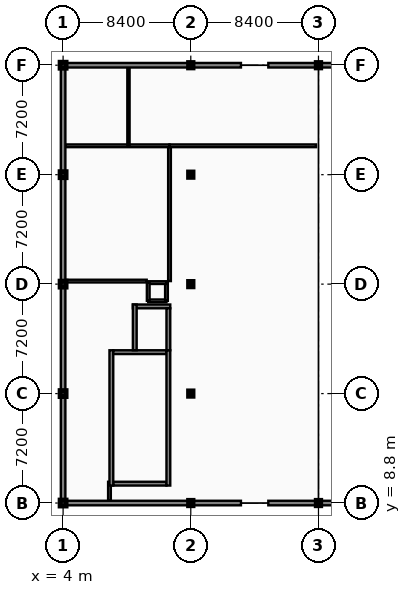
"""IFC4 building model, lengths in metres.
Left out: names, types, materials, properties, quantities, classifications, styles, units other than length and angle.
Written with IfcOpenShell. Run it as: python <this file> out.ifc"""

import sys

from ifc_helpers import new_model, si_unit, direction, frame, frame_2d, origin, origin_2d, place, context, subcontext, project, spatial, rectangle, i_section, extrude, element, fill, save


model = new_model("IFC4")
c1 = context("Model", 3, precision=1e-05, world=origin(), true_north=direction((0.0, 1.0)))
c2 = subcontext(c1, "Body", "Model", "MODEL_VIEW")
j1 = project(units=[si_unit("LENGTHUNIT", "METRE"), si_unit("PLANEANGLEUNIT", "RADIAN")], contexts=[c1])
p1 = place(None, origin())
s1 = spatial("IfcSite", under=j1, at=p1, CompositionType="ELEMENT")
p2 = place(p1, origin())
s2 = spatial("IfcBuilding", under=s1, at=p2, CompositionType="ELEMENT")
p3 = place(p2, frame((0.0, 0.0, 9.6)))
s3 = spatial("IfcBuildingStorey", under=s2, at=p3, CompositionType="ELEMENT", Elevation=9.6)
for number, where, z_axis, x_axis in (
    (1, (4.0, 8.8, 0.0), (0.0, 0.0, 1.0), (1.0, 0.0, 0.0)),
    (2, (4.0, 16.0, 0.0), (0.0, 0.0, 1.0), (1.0, 0.0, 0.0)),
    (3, (4.0, 23.2, 0.0), (0.0, 0.0, 1.0), (1.0, 0.0, 0.0)),
    (4, (4.0, 30.4, 0.0), (0.0, 0.0, 1.0), (1.0, 0.0, 0.0)),
    (5, (4.0, 37.6, 0.0), (0.0, 0.0, 1.0), (1.0, 0.0, 0.0)),
):
    element("IfcColumn", number, at=place(p3, frame(where, z_axis=z_axis, x_axis=x_axis)), inside=s3, PredefinedType="COLUMN", context=c2, shape_type="SweptSolid", body=[
        extrude(rectangle(XDim=0.4, YDim=0.4, at=origin_2d()), origin(), (0.0, 0.0, 1.0), 4.2),
    ])
for number, where, z_axis, x_axis in (
    (6, (12.4, 8.8, 0.0), (0.0, 0.0, 1.0), (1.0, 0.0, 0.0)),
    (7, (12.4, 16.0, 0.0), (0.0, 0.0, 1.0), (1.0, 0.0, 0.0)),
    (8, (12.4, 23.2, 0.0), (0.0, 0.0, 1.0), (1.0, 0.0, 0.0)),
    (9, (12.4, 30.4, 0.0), (0.0, 0.0, 1.0), (1.0, 0.0, 0.0)),
    (10, (12.4, 37.6, 0.0), (0.0, 0.0, 1.0), (1.0, 0.0, 0.0)),
    (11, (20.8, 8.8, 0.0), (0.0, 0.0, 1.0), (1.0, 0.0, 0.0)),
    (12, (20.8, 37.6, 0.0), (0.0, 0.0, 1.0), (1.0, 0.0, 0.0)),
):
    element("IfcColumn", number, at=place(p3, frame(where, z_axis=z_axis, x_axis=x_axis)), inside=s3, PredefinedType="COLUMN", context=c2, shape_type="SweptSolid", body=[
        extrude(i_section(OverallWidth=0.3, OverallDepth=0.36, WebThickness=0.012, FlangeThickness=0.022, at=origin_2d()), origin(), (0.0, 0.0, 1.0), 4.2),
    ])
p4 = place(p3, frame((7.05, 8.96, 0.0), z_axis=(0.0, 0.0, 1.0), x_axis=(0.0, 1.0, 0.0)))
e13 = element("IfcWall", 13, at=p4, inside=s3, PredefinedType="PARTITIONING", context=c2, shape_type="SweptSolid", body=[
    extrude(rectangle(XDim=1.24, YDim=0.18, at=frame_2d((0.62, 0.0))), origin(), (0.0, 0.0, 1.0), 3.63),
])
p5 = place(p3, frame((4.16, 23.4, 0.0), z_axis=(0.0, 0.0, 1.0), x_axis=(1.0, 0.0, 0.0)))
e14 = element("IfcWall", 14, at=p5, inside=s3, PredefinedType="PARTITIONING", context=c2, shape_type="SweptSolid", body=[
    extrude(rectangle(XDim=5.34, YDim=0.18, at=frame_2d((2.67, 0.0))), origin(), (0.0, 0.0, 1.0), 3.63),
])
p6 = place(p3, frame((11.0, 23.4, 0.0), z_axis=(0.0, 0.0, 1.0), x_axis=(0.0, 1.0, 0.0)))
e15 = element("IfcWall", 15, at=p6, inside=s3, PredefinedType="PARTITIONING", context=c2, shape_type="SweptSolid", body=[
    extrude(rectangle(XDim=8.9, YDim=0.18, at=frame_2d((4.45, 0.0))), origin(), (0.0, 0.0, 1.0), 3.27),
])
p7 = place(p6, frame((3.95, 0.0, -0.01)))
e16 = element("IfcOpeningElement", 16, at=p7, cuts=e15, PredefinedType="OPENING", context=c2, shape_type="SweptSolid", body=[
    extrude(rectangle(XDim=1.0, YDim=2.16, at=frame_2d((0.5, 1.08))), frame((0.0, 0.1, 0.0), z_axis=(0.0, -1.0, 0.0), x_axis=(1.0, 0.0, 0.0)), (0.0, 0.0, 1.0), 0.2),
])
p8 = place(p3, frame((4.16, 32.3, 0.0), z_axis=(0.0, 0.0, 1.0), x_axis=(1.0, 0.0, 0.0)))
e17 = element("IfcWall", 17, at=p8, inside=s3, PredefinedType="PARTITIONING", context=c2, shape_type="SweptSolid", body=[
    extrude(rectangle(XDim=6.84, YDim=0.18, at=frame_2d((3.42, 0.0))), origin(), (0.0, 0.0, 1.0), 3.59),
])
p9 = place(p3, frame((8.3, 32.3, 0.0), z_axis=(0.0, 0.0, 1.0), x_axis=(0.0, 1.0, 0.0)))
e18 = element("IfcWall", 18, at=p9, inside=s3, PredefinedType="PARTITIONING", context=c2, shape_type="SweptSolid", body=[
    extrude(rectangle(XDim=5.16, YDim=0.15, at=frame_2d((2.58, 0.0))), origin(), (0.0, 0.0, 1.0), 3.63),
])
p10 = place(p9, frame((2.105, 0.0, -0.01)))
e19 = element("IfcOpeningElement", 19, at=p10, cuts=e18, PredefinedType="OPENING", context=c2, shape_type="SweptSolid", body=[
    extrude(rectangle(XDim=0.95, YDim=2.16, at=frame_2d((0.475, 1.08))), frame((0.0, 0.085, 0.0), z_axis=(0.0, -1.0, 0.0), x_axis=(1.0, 0.0, 0.0)), (0.0, 0.0, 1.0), 0.17),
])
p11 = place(p3, frame((11.0, 32.3, 0.0), z_axis=(0.0, 0.0, 1.0), x_axis=(1.0, 0.0, 0.0)))
e20 = element("IfcWall", 20, at=p11, inside=s3, PredefinedType="PARTITIONING", context=c2, shape_type="SweptSolid", body=[
    extrude(rectangle(XDim=9.64, YDim=0.18, at=frame_2d((4.82, 0.0))), origin(), (0.0, 0.0, 1.0), 3.63),
])
p12 = place(p11, frame((3.888, 0.0, -0.01)))
e21 = element("IfcOpeningElement", 21, at=p12, cuts=e20, PredefinedType="OPENING", context=c2, shape_type="SweptSolid", body=[
    extrude(rectangle(XDim=1.0, YDim=2.16, at=frame_2d((0.5, 1.08))), frame((0.0, 0.1, 0.0), z_axis=(0.0, -1.0, 0.0), x_axis=(1.0, 0.0, 0.0)), (0.0, 0.0, 1.0), 0.2),
])
p13 = place(p3, frame((4.0, 8.8, 0.0), z_axis=(0.0, 0.0, 1.0), x_axis=(1.0, 0.0, 0.0)))
e22 = element("IfcWall", 22, at=p13, inside=s3, PredefinedType="SOLIDWALL", context=c2, shape_type="SweptSolid", body=[
    extrude(rectangle(XDim=8.4, YDim=0.3, at=frame_2d((4.2, 0.0))), origin(), (0.0, 0.0, 1.0), 3.63),
])
p14 = place(p13, frame((0.46, 0.0, 0.85)))
e23 = element("IfcOpeningElement", 23, at=p14, cuts=e22, PredefinedType="OPENING", context=c2, shape_type="SweptSolid", body=[
    extrude(rectangle(XDim=0.9, YDim=2.1, at=frame_2d((0.45, 1.05))), frame((0.0, 0.16, 0.0), z_axis=(0.0, -1.0, 0.0), x_axis=(1.0, 0.0, 0.0)), (0.0, 0.0, 1.0), 0.32),
])
p15 = place(p13, frame((6.86, 0.0, 0.85)))
e24 = element("IfcOpeningElement", 24, at=p15, cuts=e22, PredefinedType="OPENING", context=c2, shape_type="SweptSolid", body=[
    extrude(rectangle(XDim=0.9, YDim=2.1, at=frame_2d((0.45, 1.05))), frame((0.0, 0.16, 0.0), z_axis=(0.0, -1.0, 0.0), x_axis=(1.0, 0.0, 0.0)), (0.0, 0.0, 1.0), 0.32),
])
for number, where, z_axis, x_axis in (
    (25, (12.4, 8.8, 0.0), (0.0, 0.0, 1.0), (1.0, 0.0, 0.0)),
    (26, (17.5, 8.8, 0.0), (0.0, 0.0, 1.0), (1.0, 0.0, 0.0)),
    (27, (20.8, 8.8, 0.0), (0.0, 0.0, 1.0), (1.0, 0.0, 0.0)),
):
    element("IfcWall", number, at=place(p3, frame(where, z_axis=z_axis, x_axis=x_axis)), inside=s3, PredefinedType="SOLIDWALL", context=c2, shape_type="SweptSolid", body=[
        extrude(rectangle(XDim=3.3, YDim=0.3, at=frame_2d((1.65, 0.0))), origin(), (0.0, 0.0, 1.0), 4.2),
    ])
p16 = place(p3, frame((12.4, 37.6, 0.0), z_axis=(0.0, 0.0, 1.0), x_axis=(-1.0, 0.0, 0.0)))
e28 = element("IfcWall", 28, at=p16, inside=s3, PredefinedType="SOLIDWALL", context=c2, shape_type="SweptSolid", body=[
    extrude(rectangle(XDim=8.4, YDim=0.3, at=frame_2d((4.2, 0.0))), origin(), (0.0, 0.0, 1.0), 3.59),
])
p17 = place(p16, frame((0.46, 0.0, 0.85)))
e29 = element("IfcOpeningElement", 29, at=p17, cuts=e28, PredefinedType="OPENING", context=c2, shape_type="SweptSolid", body=[
    extrude(rectangle(XDim=0.9, YDim=2.1, at=frame_2d((0.45, 1.05))), frame((0.0, 0.16, 0.0), z_axis=(0.0, -1.0, 0.0), x_axis=(1.0, 0.0, 0.0)), (0.0, 0.0, 1.0), 0.32),
])
p18 = place(p16, frame((6.86, 0.0, 0.85)))
e30 = element("IfcOpeningElement", 30, at=p18, cuts=e28, PredefinedType="OPENING", context=c2, shape_type="SweptSolid", body=[
    extrude(rectangle(XDim=0.9, YDim=2.1, at=frame_2d((0.45, 1.05))), frame((0.0, 0.16, 0.0), z_axis=(0.0, -1.0, 0.0), x_axis=(1.0, 0.0, 0.0)), (0.0, 0.0, 1.0), 0.32),
])
for number, where, z_axis, x_axis in (
    (31, (20.8, 37.6, 0.0), (0.0, 0.0, 1.0), (-1.0, 0.0, 0.0)),
    (32, (15.7, 37.6, 0.0), (0.0, 0.0, 1.0), (-1.0, 0.0, 0.0)),
    (33, (24.1, 37.6, 0.0), (0.0, 0.0, 1.0), (-1.0, 0.0, 0.0)),
):
    element("IfcWall", number, at=place(p3, frame(where, z_axis=z_axis, x_axis=x_axis)), inside=s3, PredefinedType="SOLIDWALL", context=c2, shape_type="SweptSolid", body=[
        extrude(rectangle(XDim=3.3, YDim=0.3, at=frame_2d((1.65, 0.0))), origin(), (0.0, 0.0, 1.0), 4.2),
    ])
for number, where, z_axis, x_axis in (
    (34, (4.0, 16.0, 0.0), (0.0, 0.0, 1.0), (0.0, -1.0, 0.0)),
    (35, (4.0, 23.2, 0.0), (0.0, 0.0, 1.0), (0.0, -1.0, 0.0)),
):
    element("IfcWall", number, at=place(p3, frame(where, z_axis=z_axis, x_axis=x_axis)), inside=s3, PredefinedType="SOLIDWALL", context=c2, shape_type="SweptSolid", body=[
        extrude(rectangle(XDim=7.2, YDim=0.3, at=frame_2d((3.6, 0.0))), origin(), (0.0, 0.0, 1.0), 3.63),
    ])
p19 = place(p3, frame((4.0, 30.4, 0.0), z_axis=(0.0, 0.0, 1.0), x_axis=(0.0, -1.0, 0.0)))
e36 = element("IfcWall", 36, at=p19, inside=s3, PredefinedType="SOLIDWALL", context=c2, shape_type="SweptSolid", body=[
    extrude(rectangle(XDim=7.2, YDim=0.3, at=frame_2d((3.6, 0.0))), origin(), (0.0, 0.0, 1.0), 3.27),
])
p20 = place(p19, frame((0.46, 0.0, 0.85)))
e37 = element("IfcOpeningElement", 37, at=p20, cuts=e36, PredefinedType="OPENING", context=c2, shape_type="SweptSolid", body=[
    extrude(rectangle(XDim=0.9, YDim=2.1, at=frame_2d((0.45, 1.05))), frame((0.0, 0.16, 0.0), z_axis=(0.0, -1.0, 0.0), x_axis=(1.0, 0.0, 0.0)), (0.0, 0.0, 1.0), 0.32),
])
p21 = place(p19, frame((5.66, 0.0, 0.85)))
e38 = element("IfcOpeningElement", 38, at=p21, cuts=e36, PredefinedType="OPENING", context=c2, shape_type="SweptSolid", body=[
    extrude(rectangle(XDim=0.9, YDim=2.1, at=frame_2d((0.45, 1.05))), frame((0.0, 0.16, 0.0), z_axis=(0.0, -1.0, 0.0), x_axis=(1.0, 0.0, 0.0)), (0.0, 0.0, 1.0), 0.32),
])
p22 = place(p3, frame((4.0, 37.6, 0.0), z_axis=(0.0, 0.0, 1.0), x_axis=(0.0, -1.0, 0.0)))
e39 = element("IfcWall", 39, at=p22, inside=s3, PredefinedType="SOLIDWALL", context=c2, shape_type="SweptSolid", body=[
    extrude(rectangle(XDim=7.2, YDim=0.3, at=frame_2d((3.6, 0.0))), origin(), (0.0, 0.0, 1.0), 3.27),
])
p23 = place(p22, frame((0.46, 0.0, 0.85)))
e40 = element("IfcOpeningElement", 40, at=p23, cuts=e39, PredefinedType="OPENING", context=c2, shape_type="SweptSolid", body=[
    extrude(rectangle(XDim=0.9, YDim=2.1, at=frame_2d((0.45, 1.05))), frame((0.0, 0.16, 0.0), z_axis=(0.0, -1.0, 0.0), x_axis=(1.0, 0.0, 0.0)), (0.0, 0.0, 1.0), 0.32),
])
p24 = place(p22, frame((5.66, 0.0, 0.85)))
e41 = element("IfcOpeningElement", 41, at=p24, cuts=e39, PredefinedType="OPENING", context=c2, shape_type="SweptSolid", body=[
    extrude(rectangle(XDim=0.9, YDim=2.1, at=frame_2d((0.45, 1.05))), frame((0.0, 0.16, 0.0), z_axis=(0.0, -1.0, 0.0), x_axis=(1.0, 0.0, 0.0)), (0.0, 0.0, 1.0), 0.32),
])
p25 = place(p3, frame((7.3, 10.075, 0.0), z_axis=(0.0, 0.0, 1.0), x_axis=(1.0, 0.0, 0.0)))
e42 = element("IfcWall", 42, at=p25, inside=s3, PredefinedType="SHEAR", context=c2, shape_type="SweptSolid", body=[
    extrude(rectangle(XDim=3.5, YDim=0.25, at=frame_2d((1.75, 0.0))), origin(), (0.0, 0.0, 1.0), 4.2),
])
p26 = place(p25, frame((1.1, 0.0, -0.01)))
e43 = element("IfcOpeningElement", 43, at=p26, cuts=e42, PredefinedType="OPENING", context=c2, shape_type="SweptSolid", body=[
    extrude(rectangle(XDim=1.3, YDim=2.16, at=frame_2d((0.65, 1.08))), frame((0.0, 0.135, 0.0), z_axis=(0.0, -1.0, 0.0), x_axis=(1.0, 0.0, 0.0)), (0.0, 0.0, 1.0), 0.27),
])
p27 = place(p3, frame((7.175, 9.95, 0.0), z_axis=(0.0, 0.0, 1.0), x_axis=(0.0, 1.0, 0.0)))
e44 = element("IfcWall", 44, at=p27, inside=s3, PredefinedType="SHEAR", context=c2, shape_type="SweptSolid", body=[
    extrude(rectangle(XDim=8.9, YDim=0.25, at=frame_2d((4.45, 0.0))), origin(), (0.0, 0.0, 1.0), 4.2),
])
p28 = place(p3, frame((10.8, 18.725, 0.0), z_axis=(0.0, 0.0, 1.0), x_axis=(-1.0, 0.0, 0.0)))
e45 = element("IfcWall", 45, at=p28, inside=s3, PredefinedType="SHEAR", context=c2, shape_type="SweptSolid", body=[
    extrude(rectangle(XDim=3.5, YDim=0.25, at=frame_2d((1.75, 0.0))), origin(), (0.0, 0.0, 1.0), 4.2),
])
p29 = place(p3, frame((10.925, 9.95, 0.0), z_axis=(0.0, 0.0, 1.0), x_axis=(0.0, 1.0, 0.0)))
e46 = element("IfcWall", 46, at=p29, inside=s3, PredefinedType="SHEAR", context=c2, shape_type="SweptSolid", body=[
    extrude(rectangle(XDim=8.9, YDim=0.25, at=frame_2d((4.45, 0.0))), origin(), (0.0, 0.0, 1.0), 4.2),
])
p30 = place(p3, frame((8.59, 21.735, 0.0), z_axis=(0.0, 0.0, 1.0), x_axis=(1.0, 0.0, 0.0)))
e47 = element("IfcWall", 47, at=p30, inside=s3, PredefinedType="SHEAR", context=c2, shape_type="SweptSolid", body=[
    extrude(rectangle(XDim=2.46, YDim=0.25, at=frame_2d((1.23, 0.0))), origin(), (0.0, 0.0, 1.0), 4.2),
])
p31 = place(p3, frame((10.925, 18.85, 0.0), z_axis=(0.0, 0.0, 1.0), x_axis=(0.0, 1.0, 0.0)))
e48 = element("IfcWall", 48, at=p31, inside=s3, PredefinedType="SHEAR", context=c2, shape_type="SweptSolid", body=[
    extrude(rectangle(XDim=2.76, YDim=0.25, at=frame_2d((1.38, 0.0))), origin(), (0.0, 0.0, 1.0), 4.2),
])
p32 = place(p31, frame((0.83, 0.0, -0.01)))
e49 = element("IfcOpeningElement", 49, at=p32, cuts=e48, PredefinedType="OPENING", context=c2, shape_type="SweptSolid", body=[
    extrude(rectangle(XDim=1.1, YDim=2.16, at=frame_2d((0.55, 1.08))), frame((0.0, 0.135, 0.0), z_axis=(0.0, -1.0, 0.0), x_axis=(1.0, 0.0, 0.0)), (0.0, 0.0, 1.0), 0.27),
])
p33 = place(p3, frame((8.715, 18.85, 0.0), z_axis=(0.0, 0.0, 1.0), x_axis=(0.0, 1.0, 0.0)))
e50 = element("IfcWall", 50, at=p33, inside=s3, PredefinedType="SHEAR", context=c2, shape_type="SweptSolid", body=[
    extrude(rectangle(XDim=3.01, YDim=0.25, at=frame_2d((1.505, 0.0))), origin(), (0.0, 0.0, 1.0), 4.2),
])
p34 = place(p3, frame((9.6, 22.1, 0.0), z_axis=(0.0, 0.0, 1.0), x_axis=(1.0, 0.0, 0.0)))
e51 = element("IfcWall", 51, at=p34, inside=s3, PredefinedType="SOLIDWALL", context=c2, shape_type="SweptSolid", body=[
    extrude(rectangle(XDim=1.2, YDim=0.18, at=frame_2d((0.6, 0.0))), origin(), (0.0, 0.0, 1.0), 3.97),
])
p35 = place(p3, frame((10.8, 22.1, 0.0), z_axis=(0.0, 0.0, 1.0), x_axis=(0.0, 1.0, 0.0)))
e52 = element("IfcWall", 52, at=p35, inside=s3, PredefinedType="SOLIDWALL", context=c2, shape_type="SweptSolid", body=[
    extrude(rectangle(XDim=1.2, YDim=0.18, at=frame_2d((0.6, 0.0))), origin(), (0.0, 0.0, 1.0), 3.97),
])
p36 = place(p35, frame((0.2, 0.0, -0.01)))
e53 = element("IfcOpeningElement", 53, at=p36, cuts=e52, PredefinedType="OPENING", context=c2, shape_type="SweptSolid", body=[
    extrude(rectangle(XDim=0.8, YDim=2.06, at=frame_2d((0.4, 1.03))), frame((0.0, 0.1, 0.0), z_axis=(0.0, -1.0, 0.0), x_axis=(1.0, 0.0, 0.0)), (0.0, 0.0, 1.0), 0.2),
])
for number, where, z_axis, x_axis in (
    (54, (10.8, 23.3, 0.0), (0.0, 0.0, 1.0), (-1.0, 0.0, 0.0)),
    (55, (9.6, 23.3, 0.0), (0.0, 0.0, 1.0), (0.0, -1.0, 0.0)),
):
    element("IfcWall", number, at=place(p3, frame(where, z_axis=z_axis, x_axis=x_axis)), inside=s3, PredefinedType="SOLIDWALL", context=c2, shape_type="SweptSolid", body=[
        extrude(rectangle(XDim=1.2, YDim=0.18, at=frame_2d((0.6, 0.0))), origin(), (0.0, 0.0, 1.0), 3.97),
    ])
p37 = place(p7, frame((0.0, 0.0, 0.01)))
e56 = element("IfcDoor", 56, at=p37, inside=s3, OperationType="SINGLE_SWING_RIGHT", PredefinedType="DOOR", context=c2, shape_type="SweptSolid", body=[
    extrude(rectangle(XDim=1.0, YDim=2.15, at=frame_2d((0.5, 1.075))), frame((0.0, 0.025, 0.0), z_axis=(0.0, -1.0, 0.0), x_axis=(1.0, 0.0, 0.0)), (0.0, 0.0, 1.0), 0.05),
])
fill(e16, e56)
p38 = place(p10, frame((0.95, 0.0, 0.01), z_axis=(0.0, 0.0, 1.0), x_axis=(-1.0, 0.0, 0.0)))
e57 = element("IfcDoor", 57, at=p38, inside=s3, OperationType="SINGLE_SWING_LEFT", PredefinedType="DOOR", context=c2, shape_type="SweptSolid", body=[
    extrude(rectangle(XDim=0.95, YDim=2.15, at=frame_2d((0.475, 1.075))), frame((0.0, 0.025, 0.0), z_axis=(0.0, -1.0, 0.0), x_axis=(1.0, 0.0, 0.0)), (0.0, 0.0, 1.0), 0.05),
])
fill(e19, e57)
p39 = place(p12, frame((0.0, 0.0, 0.01)))
e58 = element("IfcDoor", 58, at=p39, inside=s3, OperationType="SINGLE_SWING_RIGHT", PredefinedType="DOOR", context=c2, shape_type="SweptSolid", body=[
    extrude(rectangle(XDim=1.0, YDim=2.15, at=frame_2d((0.5, 1.075))), frame((0.0, 0.025, 0.0), z_axis=(0.0, -1.0, 0.0), x_axis=(1.0, 0.0, 0.0)), (0.0, 0.0, 1.0), 0.05),
])
fill(e21, e58)
p40 = place(p14, origin())
e59 = element("IfcWindow", 59, at=p40, inside=s3, PartitioningType="SINGLE_PANEL", PredefinedType="WINDOW", context=c2, shape_type="SweptSolid", body=[
    extrude(rectangle(XDim=0.9, YDim=2.1, at=frame_2d((0.45, 1.05))), frame((0.0, 0.03, 0.0), z_axis=(0.0, -1.0, 0.0), x_axis=(1.0, 0.0, 0.0)), (0.0, 0.0, 1.0), 0.06),
])
fill(e23, e59)
p41 = place(p15, origin())
e60 = element("IfcWindow", 60, at=p41, inside=s3, PartitioningType="SINGLE_PANEL", PredefinedType="WINDOW", context=c2, shape_type="SweptSolid", body=[
    extrude(rectangle(XDim=0.9, YDim=2.1, at=frame_2d((0.45, 1.05))), frame((0.0, 0.03, 0.0), z_axis=(0.0, -1.0, 0.0), x_axis=(1.0, 0.0, 0.0)), (0.0, 0.0, 1.0), 0.06),
])
fill(e24, e60)
p42 = place(p17, origin())
e61 = element("IfcWindow", 61, at=p42, inside=s3, PartitioningType="SINGLE_PANEL", PredefinedType="WINDOW", context=c2, shape_type="SweptSolid", body=[
    extrude(rectangle(XDim=0.9, YDim=2.1, at=frame_2d((0.45, 1.05))), frame((0.0, 0.03, 0.0), z_axis=(0.0, -1.0, 0.0), x_axis=(1.0, 0.0, 0.0)), (0.0, 0.0, 1.0), 0.06),
])
fill(e29, e61)
p43 = place(p18, origin())
e62 = element("IfcWindow", 62, at=p43, inside=s3, PartitioningType="SINGLE_PANEL", PredefinedType="WINDOW", context=c2, shape_type="SweptSolid", body=[
    extrude(rectangle(XDim=0.9, YDim=2.1, at=frame_2d((0.45, 1.05))), frame((0.0, 0.03, 0.0), z_axis=(0.0, -1.0, 0.0), x_axis=(1.0, 0.0, 0.0)), (0.0, 0.0, 1.0), 0.06),
])
fill(e30, e62)
p44 = place(p20, origin())
e63 = element("IfcWindow", 63, at=p44, inside=s3, PartitioningType="SINGLE_PANEL", PredefinedType="WINDOW", context=c2, shape_type="SweptSolid", body=[
    extrude(rectangle(XDim=0.9, YDim=2.1, at=frame_2d((0.45, 1.05))), frame((0.0, 0.03, 0.0), z_axis=(0.0, -1.0, 0.0), x_axis=(1.0, 0.0, 0.0)), (0.0, 0.0, 1.0), 0.06),
])
fill(e37, e63)
p45 = place(p21, origin())
e64 = element("IfcWindow", 64, at=p45, inside=s3, PartitioningType="SINGLE_PANEL", PredefinedType="WINDOW", context=c2, shape_type="SweptSolid", body=[
    extrude(rectangle(XDim=0.9, YDim=2.1, at=frame_2d((0.45, 1.05))), frame((0.0, 0.03, 0.0), z_axis=(0.0, -1.0, 0.0), x_axis=(1.0, 0.0, 0.0)), (0.0, 0.0, 1.0), 0.06),
])
fill(e38, e64)
p46 = place(p23, origin())
e65 = element("IfcWindow", 65, at=p46, inside=s3, PartitioningType="SINGLE_PANEL", PredefinedType="WINDOW", context=c2, shape_type="SweptSolid", body=[
    extrude(rectangle(XDim=0.9, YDim=2.1, at=frame_2d((0.45, 1.05))), frame((0.0, 0.03, 0.0), z_axis=(0.0, -1.0, 0.0), x_axis=(1.0, 0.0, 0.0)), (0.0, 0.0, 1.0), 0.06),
])
fill(e40, e65)
p47 = place(p24, origin())
e66 = element("IfcWindow", 66, at=p47, inside=s3, PartitioningType="SINGLE_PANEL", PredefinedType="WINDOW", context=c2, shape_type="SweptSolid", body=[
    extrude(rectangle(XDim=0.9, YDim=2.1, at=frame_2d((0.45, 1.05))), frame((0.0, 0.03, 0.0), z_axis=(0.0, -1.0, 0.0), x_axis=(1.0, 0.0, 0.0)), (0.0, 0.0, 1.0), 0.06),
])
fill(e41, e66)
p48 = place(p26, frame((1.3, 0.0, 0.01), z_axis=(0.0, 0.0, 1.0), x_axis=(-1.0, 0.0, 0.0)))
e67 = element("IfcDoor", 67, at=p48, inside=s3, OperationType="SINGLE_SWING_LEFT", PredefinedType="DOOR", context=c2, shape_type="SweptSolid", body=[
    extrude(rectangle(XDim=1.3, YDim=2.15, at=frame_2d((0.65, 1.075))), frame((0.0, 0.025, 0.0), z_axis=(0.0, -1.0, 0.0), x_axis=(1.0, 0.0, 0.0)), (0.0, 0.0, 1.0), 0.05),
])
fill(e43, e67)
p49 = place(p32, frame((0.0, 0.0, 0.01)))
e68 = element("IfcDoor", 68, at=p49, inside=s3, OperationType="SLIDING_TO_LEFT", PredefinedType="DOOR", context=c2, shape_type="SweptSolid", body=[
    extrude(rectangle(XDim=1.1, YDim=2.15, at=frame_2d((0.55, 1.075))), frame((0.0, 0.025, 0.0), z_axis=(0.0, -1.0, 0.0), x_axis=(1.0, 0.0, 0.0)), (0.0, 0.0, 1.0), 0.05),
])
fill(e49, e68)
p50 = place(p36, frame((0.0, 0.0, 0.01)))
e69 = element("IfcDoor", 69, at=p50, inside=s3, OperationType="SINGLE_SWING_RIGHT", PredefinedType="DOOR", context=c2, shape_type="SweptSolid", body=[
    extrude(rectangle(XDim=0.8, YDim=2.05, at=frame_2d((0.4, 1.025))), frame((0.0, 0.025, 0.0), z_axis=(0.0, -1.0, 0.0), x_axis=(1.0, 0.0, 0.0)), (0.0, 0.0, 1.0), 0.05),
])
fill(e53, e69)
save(model, sys.argv[1])
